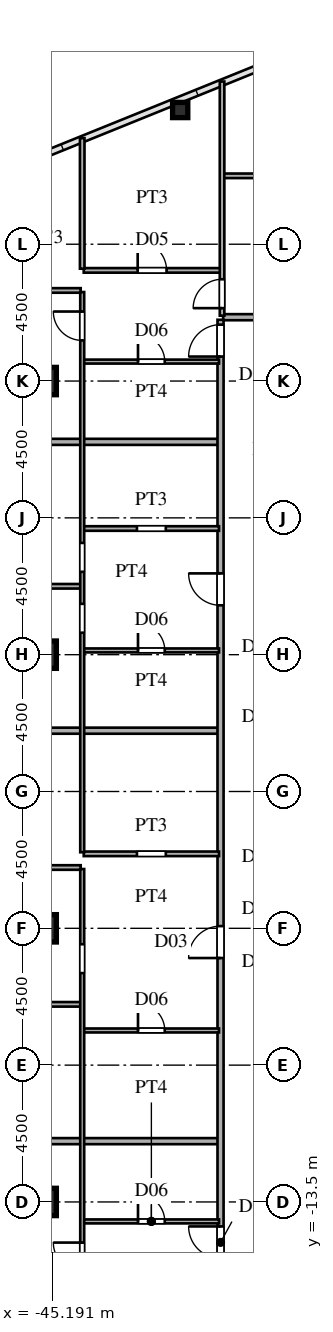
"""IFC4 building model, lengths in metres.
Left out: names, types, materials, properties, quantities, classifications, styles, units other than length and angle.
Written with IfcOpenShell. Run it as: python <this file> out.ifc"""

import sys

from ifc_helpers import new_model, si_unit, direction, frame, frame_2d, origin, origin_2d, place, context, subcontext, project, spatial, rectangle, hollow_rectangle, i_section, extrude, source, transform, mapped, element, fill, save


model = new_model("IFC4")
c1 = context("Model", 3, precision=1e-05, world=origin(), true_north=direction((0.0, 1.0)))
c2 = subcontext(c1, "Body", "Model", "MODEL_VIEW")
j1 = project(units=[si_unit("LENGTHUNIT", "METRE"), si_unit("PLANEANGLEUNIT", "RADIAN")], contexts=[c1])
p1 = place(None, origin())
s1 = spatial("IfcSite", under=j1, at=p1, CompositionType="ELEMENT")
p2 = place(p1, origin())
s2 = spatial("IfcBuilding", under=s1, at=p2, CompositionType="ELEMENT")
p3 = place(p2, frame((0.0, 0.0, 33.3)))
s3 = spatial("IfcBuildingStorey", under=s2, at=p3, CompositionType="ELEMENT", Elevation=33.3)
m1 = source(origin(), c2, "Body", "SweptSolid", [
    extrude(i_section(OverallWidth=0.9, OverallDepth=0.9, WebThickness=0.036, FlangeThickness=0.055, at=origin_2d()), origin(), (0.0, 0.0, 1.0), 3.6),
])
for number, where, z_axis, x_axis in (
    (1, (-45.5, -13.5, 0.0), (0.0, 0.0, 1.0), (1.0, 0.0, 0.0)),
    (2, (-45.5, -4.5, 0.0), (0.0, 0.0, 1.0), (1.0, 0.0, 0.0)),
    (3, (-45.5, 4.5, 0.0), (0.0, 0.0, 1.0), (1.0, 0.0, 0.0)),
    (4, (-45.5, 13.5, 0.0), (0.0, 0.0, 1.0), (1.0, 0.0, 0.0)),
):
    element("IfcColumn", number, at=place(p3, frame(where, z_axis=z_axis, x_axis=x_axis)), inside=s3, PredefinedType="COLUMN", context=c2, shape_type="MappedRepresentation", body=[
        mapped(m1, transform((0.0, 0.0, 0.0), scale=1.0)),
    ])
m2 = source(origin(), c2, "Body", "SweptSolid", [
    extrude(hollow_rectangle(XDim=0.5, YDim=0.5, WallThickness=0.02, at=origin_2d()), origin(), (0.0, 0.0, 1.0), 3.6),
])
p4 = place(p3, frame((-40.977, 22.414, 0.0), z_axis=(0.0, 0.0, 1.0), x_axis=(1.0, 0.0, 0.0)))
e5 = element("IfcColumn", 5, at=p4, inside=s3, PredefinedType="COLUMN", context=c2, shape_type="MappedRepresentation", body=[
    mapped(m2, transform((0.0, 0.0, 0.0), scale=1.0)),
])
p5 = place(p3, frame((-44.15, -14.14, 0.0), z_axis=(0.0, 0.0, 1.0), x_axis=(1.0, 0.0, 0.0)))
e6 = element("IfcWall", 6, at=p5, inside=s3, PredefinedType="PARTITIONING", context=c2, shape_type="SweptSolid", body=[
    extrude(rectangle(XDim=4.45, YDim=0.13, at=frame_2d((2.225, 0.0))), origin(), (0.0, 0.0, 1.0), 3.38),
])
p6 = place(p5, frame((1.785, 0.0, 0.0)))
e7 = element("IfcOpeningElement", 7, at=p6, cuts=e6, PredefinedType="OPENING", context=c2, shape_type="SweptSolid", body=[
    extrude(rectangle(XDim=0.88, YDim=2.1, at=frame_2d((0.44, 1.05))), frame((0.0, 0.075, 0.0), z_axis=(0.0, -1.0, 0.0), x_axis=(1.0, 0.0, 0.0)), (0.0, 0.0, 1.0), 0.15),
])
p7 = place(p3, frame((-68.807, -11.5, 0.0), z_axis=(0.0, 0.0, 1.0), x_axis=(1.0, 0.0, 0.0)))
e8 = element("IfcWall", 8, at=p7, inside=s3, PredefinedType="PARTITIONING", context=c2, shape_type="SweptSolid", body=[
    extrude(rectangle(XDim=29.077, YDim=0.2, at=frame_2d((14.539, 0.0))), origin(), (0.0, 0.0, 1.0), 3.38),
])
p8 = place(p3, frame((-44.15, -7.86, 0.0), z_axis=(0.0, 0.0, 1.0), x_axis=(1.0, 0.0, 0.0)))
e9 = element("IfcWall", 9, at=p8, inside=s3, PredefinedType="PARTITIONING", context=c2, shape_type="SweptSolid", body=[
    extrude(rectangle(XDim=4.45, YDim=0.13, at=frame_2d((2.225, 0.0))), origin(), (0.0, 0.0, 1.0), 3.38),
])
p9 = place(p8, frame((1.785, 0.0, 0.0)))
e10 = element("IfcOpeningElement", 10, at=p9, cuts=e9, PredefinedType="OPENING", context=c2, shape_type="SweptSolid", body=[
    extrude(rectangle(XDim=0.88, YDim=2.1, at=frame_2d((0.44, 1.05))), frame((0.0, 0.075, 0.0), z_axis=(0.0, -1.0, 0.0), x_axis=(1.0, 0.0, 0.0)), (0.0, 0.0, 1.0), 0.15),
])
p10 = place(p3, frame((-72.535, -7.0, 0.0), z_axis=(0.0, 0.0, 1.0), x_axis=(1.0, 0.0, 0.0)))
e11 = element("IfcWall", 11, at=p10, inside=s3, PredefinedType="PARTITIONING", context=c2, shape_type="SweptSolid", body=[
    extrude(rectangle(XDim=28.285, YDim=0.15, at=frame_2d((14.143, 0.0))), origin(), (0.0, 0.0, 1.0), 3.38),
])
p11 = place(p10, frame((22.71, 0.0, 0.0)))
e12 = element("IfcOpeningElement", 12, at=p11, cuts=e11, PredefinedType="OPENING", context=c2, shape_type="SweptSolid", body=[
    extrude(rectangle(XDim=0.95, YDim=2.15, at=frame_2d((0.475, 1.075))), frame((0.0, 0.085, 0.0), z_axis=(0.0, -1.0, 0.0), x_axis=(1.0, 0.0, 0.0)), (0.0, 0.0, 1.0), 0.17),
])
p12 = place(p10, frame((14.71, 0.0, 0.0)))
e13 = element("IfcOpeningElement", 13, at=p12, cuts=e11, PredefinedType="OPENING", context=c2, shape_type="SweptSolid", body=[
    extrude(rectangle(XDim=0.95, YDim=2.15, at=frame_2d((0.475, 1.075))), frame((0.0, 0.085, 0.0), z_axis=(0.0, -1.0, 0.0), x_axis=(1.0, 0.0, 0.0)), (0.0, 0.0, 1.0), 0.17),
])
p13 = place(p3, frame((-72.535, -2.5, 0.0), z_axis=(0.0, 0.0, 1.0), x_axis=(1.0, 0.0, 0.0)))
e14 = element("IfcWall", 14, at=p13, inside=s3, PredefinedType="PARTITIONING", context=c2, shape_type="SweptSolid", body=[
    extrude(rectangle(XDim=28.285, YDim=0.15, at=frame_2d((14.143, 0.0))), origin(), (0.0, 0.0, 1.0), 3.38),
])
p14 = place(p13, frame((22.71, 0.0, 0.0)))
e15 = element("IfcOpeningElement", 15, at=p14, cuts=e14, PredefinedType="OPENING", context=c2, shape_type="SweptSolid", body=[
    extrude(rectangle(XDim=0.95, YDim=2.15, at=frame_2d((0.475, 1.075))), frame((0.0, 0.085, 0.0), z_axis=(0.0, -1.0, 0.0), x_axis=(1.0, 0.0, 0.0)), (0.0, 0.0, 1.0), 0.17),
])
p15 = place(p13, frame((14.71, 0.0, 0.0)))
e16 = element("IfcOpeningElement", 16, at=p15, cuts=e14, PredefinedType="OPENING", context=c2, shape_type="SweptSolid", body=[
    extrude(rectangle(XDim=0.95, YDim=2.15, at=frame_2d((0.475, 1.075))), frame((0.0, 0.085, 0.0), z_axis=(0.0, -1.0, 0.0), x_axis=(1.0, 0.0, 0.0)), (0.0, 0.0, 1.0), 0.17),
])
p16 = place(p3, frame((-44.15, -2.05, 0.0), z_axis=(0.0, 0.0, 1.0), x_axis=(1.0, 0.0, 0.0)))
e17 = element("IfcWall", 17, at=p16, inside=s3, PredefinedType="PARTITIONING", context=c2, shape_type="SweptSolid", body=[
    extrude(rectangle(XDim=4.45, YDim=0.15, at=frame_2d((2.225, 0.0))), origin(), (0.0, 0.0, 1.0), 3.38),
])
p17 = place(p16, frame((1.75, 0.0, 0.0)))
e18 = element("IfcOpeningElement", 18, at=p17, cuts=e17, PredefinedType="OPENING", context=c2, shape_type="SweptSolid", body=[
    extrude(rectangle(XDim=0.95, YDim=2.15, at=frame_2d((0.475, 1.075))), frame((0.0, 0.085, 0.0), z_axis=(0.0, -1.0, 0.0), x_axis=(1.0, 0.0, 0.0)), (0.0, 0.0, 1.0), 0.17),
])
p18 = place(p3, frame((-72.505, 2.0, 0.0), z_axis=(0.0, 0.0, 1.0), x_axis=(1.0, 0.0, 0.0)))
e19 = element("IfcWall", 19, at=p18, inside=s3, PredefinedType="PARTITIONING", context=c2, shape_type="SweptSolid", body=[
    extrude(rectangle(XDim=32.775, YDim=0.2, at=frame_2d((16.387, 0.0))), origin(), (0.0, 0.0, 1.0), 3.38),
])
p19 = place(p3, frame((-44.15, 4.64, 0.0), z_axis=(0.0, 0.0, 1.0), x_axis=(1.0, 0.0, 0.0)))
e20 = element("IfcWall", 20, at=p19, inside=s3, PredefinedType="PARTITIONING", context=c2, shape_type="SweptSolid", body=[
    extrude(rectangle(XDim=4.45, YDim=0.13, at=frame_2d((2.225, 0.0))), origin(), (0.0, 0.0, 1.0), 2.68),
])
p20 = place(p19, frame((1.785, 0.0, 0.0)))
e21 = element("IfcOpeningElement", 21, at=p20, cuts=e20, PredefinedType="OPENING", context=c2, shape_type="SweptSolid", body=[
    extrude(rectangle(XDim=0.88, YDim=2.1, at=frame_2d((0.44, 1.05))), frame((0.0, 0.075, 0.0), z_axis=(0.0, -1.0, 0.0), x_axis=(1.0, 0.0, 0.0)), (0.0, 0.0, 1.0), 0.15),
])
p21 = place(p3, frame((-72.535, 6.75, 0.0), z_axis=(0.0, 0.0, 1.0), x_axis=(1.0, 0.0, 0.0)))
e22 = element("IfcWall", 22, at=p21, inside=s3, PredefinedType="PARTITIONING", context=c2, shape_type="SweptSolid", body=[
    extrude(rectangle(XDim=28.285, YDim=0.15, at=frame_2d((14.143, 0.0))), origin(), (0.0, 0.0, 1.0), 3.38),
])
p22 = place(p21, frame((5.71, 0.0, 0.0)))
e23 = element("IfcOpeningElement", 23, at=p22, cuts=e22, PredefinedType="OPENING", context=c2, shape_type="SweptSolid", body=[
    extrude(rectangle(XDim=0.95, YDim=2.15, at=frame_2d((0.475, 1.075))), frame((0.0, 0.085, 0.0), z_axis=(0.0, -1.0, 0.0), x_axis=(1.0, 0.0, 0.0)), (0.0, 0.0, 1.0), 0.17),
])
p23 = place(p21, frame((14.71, 0.0, 0.0)))
e24 = element("IfcOpeningElement", 24, at=p23, cuts=e22, PredefinedType="OPENING", context=c2, shape_type="SweptSolid", body=[
    extrude(rectangle(XDim=0.95, YDim=2.15, at=frame_2d((0.475, 1.075))), frame((0.0, 0.085, 0.0), z_axis=(0.0, -1.0, 0.0), x_axis=(1.0, 0.0, 0.0)), (0.0, 0.0, 1.0), 0.17),
])
p24 = place(p3, frame((-44.15, 8.65, 0.0), z_axis=(0.0, 0.0, 1.0), x_axis=(1.0, 0.0, 0.0)))
e25 = element("IfcWall", 25, at=p24, inside=s3, PredefinedType="PARTITIONING", context=c2, shape_type="SweptSolid", body=[
    extrude(rectangle(XDim=4.45, YDim=0.15, at=frame_2d((2.225, 0.0))), origin(), (0.0, 0.0, 1.0), 3.38),
])
p25 = place(p24, frame((1.75, 0.0, 0.0)))
e26 = element("IfcOpeningElement", 26, at=p25, cuts=e25, PredefinedType="OPENING", context=c2, shape_type="SweptSolid", body=[
    extrude(rectangle(XDim=0.95, YDim=2.15, at=frame_2d((0.475, 1.075))), frame((0.0, 0.085, 0.0), z_axis=(0.0, -1.0, 0.0), x_axis=(1.0, 0.0, 0.0)), (0.0, 0.0, 1.0), 0.17),
])
p26 = place(p3, frame((-68.807, 11.5, 0.0), z_axis=(0.0, 0.0, 1.0), x_axis=(1.0, 0.0, 0.0)))
e27 = element("IfcWall", 27, at=p26, inside=s3, PredefinedType="PARTITIONING", context=c2, shape_type="SweptSolid", body=[
    extrude(rectangle(XDim=29.077, YDim=0.2, at=frame_2d((14.539, 0.0))), origin(), (0.0, 0.0, 1.0), 3.38),
])
p27 = place(p3, frame((-44.15, 14.14, 0.0), z_axis=(0.0, 0.0, 1.0), x_axis=(1.0, 0.0, 0.0)))
e28 = element("IfcWall", 28, at=p27, inside=s3, PredefinedType="PARTITIONING", context=c2, shape_type="SweptSolid", body=[
    extrude(rectangle(XDim=4.45, YDim=0.13, at=frame_2d((2.225, 0.0))), origin(), (0.0, 0.0, 1.0), 3.38),
])
p28 = place(p27, frame((1.785, 0.0, 0.0)))
e29 = element("IfcOpeningElement", 29, at=p28, cuts=e28, PredefinedType="OPENING", context=c2, shape_type="SweptSolid", body=[
    extrude(rectangle(XDim=0.88, YDim=2.1, at=frame_2d((0.44, 1.05))), frame((0.0, 0.075, 0.0), z_axis=(0.0, -1.0, 0.0), x_axis=(1.0, 0.0, 0.0)), (0.0, 0.0, 1.0), 0.15),
])
p29 = place(p3, frame((-39.565, 15.6, 0.0), z_axis=(0.0, 0.0, 1.0), x_axis=(1.0, 0.0, 0.0)))
e30 = element("IfcWall", 30, at=p29, inside=s3, PredefinedType="PARTITIONING", context=c2, shape_type="SweptSolid", body=[
    extrude(rectangle(XDim=2.98, YDim=0.2, at=frame_2d((1.49, 0.0))), origin(), (0.0, 0.0, 1.0), 3.38),
])
p30 = place(p3, frame((-54.45, 16.48, 0.0), z_axis=(0.0, 0.0, 1.0), x_axis=(1.0, 0.0, 0.0)))
e31 = element("IfcWall", 31, at=p30, inside=s3, PredefinedType="PARTITIONING", context=c2, shape_type="SweptSolid", body=[
    extrude(rectangle(XDim=10.2, YDim=0.15, at=frame_2d((5.1, 0.0))), origin(), (0.0, 0.0, 1.0), 3.38),
])
p31 = place(p30, frame((4.625, 0.0, 0.0)))
e32 = element("IfcOpeningElement", 32, at=p31, cuts=e31, PredefinedType="OPENING", context=c2, shape_type="SweptSolid", body=[
    extrude(rectangle(XDim=0.95, YDim=2.15, at=frame_2d((0.475, 1.075))), frame((0.0, 0.085, 0.0), z_axis=(0.0, -1.0, 0.0), x_axis=(1.0, 0.0, 0.0)), (0.0, 0.0, 1.0), 0.17),
])
p32 = place(p3, frame((-44.15, 17.14, 0.0), z_axis=(0.0, 0.0, 1.0), x_axis=(1.0, 0.0, 0.0)))
e33 = element("IfcWall", 33, at=p32, inside=s3, PredefinedType="PARTITIONING", context=c2, shape_type="SweptSolid", body=[
    extrude(rectangle(XDim=4.5, YDim=0.15, at=frame_2d((2.25, 0.0))), origin(), (0.0, 0.0, 1.0), 3.38),
])
p33 = place(p32, frame((1.775, 0.0, 0.0)))
e34 = element("IfcOpeningElement", 34, at=p33, cuts=e33, PredefinedType="OPENING", context=c2, shape_type="SweptSolid", body=[
    extrude(rectangle(XDim=0.95, YDim=2.15, at=frame_2d((0.475, 1.075))), frame((0.0, 0.085, 0.0), z_axis=(0.0, -1.0, 0.0), x_axis=(1.0, 0.0, 0.0)), (0.0, 0.0, 1.0), 0.17),
])
p34 = place(p3, frame((-39.55, 20.25, 0.0), z_axis=(0.0, 0.0, 1.0), x_axis=(1.0, 0.0, 0.0)))
e35 = element("IfcWall", 35, at=p34, inside=s3, PredefinedType="PARTITIONING", context=c2, shape_type="SweptSolid", body=[
    extrude(rectangle(XDim=12.085, YDim=0.15, at=frame_2d((6.042, 0.0))), origin(), (0.0, 0.0, 1.0), 3.38),
])
p35 = place(p34, frame((5.525, 0.0, 0.0)))
e36 = element("IfcOpeningElement", 36, at=p35, cuts=e35, PredefinedType="OPENING", context=c2, shape_type="SweptSolid", body=[
    extrude(rectangle(XDim=0.95, YDim=2.15, at=frame_2d((0.475, 1.075))), frame((0.0, 0.085, 0.0), z_axis=(0.0, -1.0, 0.0), x_axis=(1.0, 0.0, 0.0)), (0.0, 0.0, 1.0), 0.17),
])
p36 = place(p3, frame((-44.2, -16.427, 0.0), z_axis=(0.0, 0.0, 1.0), x_axis=(0.0, 1.0, 0.0)))
e37 = element("IfcWall", 37, at=p36, inside=s3, PredefinedType="PARTITIONING", context=c2, shape_type="SweptSolid", body=[
    extrude(rectangle(XDim=13.877, YDim=0.13, at=frame_2d((6.938, 0.0))), origin(), (0.0, 0.0, 1.0), 3.38),
])
p37 = place(p36, frame((0.641, 0.0, 0.0)))
e38 = element("IfcOpeningElement", 38, at=p37, cuts=e37, PredefinedType="OPENING", context=c2, shape_type="SweptSolid", body=[
    extrude(rectangle(XDim=0.95, YDim=2.15, at=frame_2d((0.475, 1.075))), frame((0.0, 0.075, 0.0), z_axis=(0.0, -1.0, 0.0), x_axis=(1.0, 0.0, 0.0)), (0.0, 0.0, 1.0), 0.15),
])
p38 = place(p36, frame((10.454, 0.0, 0.0)))
e39 = element("IfcOpeningElement", 39, at=p38, cuts=e37, PredefinedType="OPENING", context=c2, shape_type="SweptSolid", body=[
    extrude(rectangle(XDim=0.95, YDim=2.15, at=frame_2d((0.475, 1.075))), frame((0.0, 0.075, 0.0), z_axis=(0.0, -1.0, 0.0), x_axis=(1.0, 0.0, 0.0)), (0.0, 0.0, 1.0), 0.15),
])
p39 = place(p3, frame((-44.2, -1.998, 0.0), z_axis=(0.0, 0.0, 1.0), x_axis=(0.0, 1.0, 0.0)))
e40 = element("IfcWall", 40, at=p39, inside=s3, PredefinedType="PARTITIONING", context=c2, shape_type="SweptSolid", body=[
    extrude(rectangle(XDim=18.425, YDim=0.13, at=frame_2d((9.212, 0.0))), origin(), (0.0, 0.0, 1.0), 3.38),
])
p40 = place(p39, frame((7.22, 0.0, 0.0)))
e41 = element("IfcOpeningElement", 41, at=p40, cuts=e40, PredefinedType="OPENING", context=c2, shape_type="SweptSolid", body=[
    extrude(rectangle(XDim=0.95, YDim=2.15, at=frame_2d((0.475, 1.075))), frame((0.0, 0.075, 0.0), z_axis=(0.0, -1.0, 0.0), x_axis=(1.0, 0.0, 0.0)), (0.0, 0.0, 1.0), 0.15),
])
p41 = place(p39, frame((9.224, 0.0, 0.0)))
e42 = element("IfcOpeningElement", 42, at=p41, cuts=e40, PredefinedType="OPENING", context=c2, shape_type="SweptSolid", body=[
    extrude(rectangle(XDim=0.95, YDim=2.15, at=frame_2d((0.475, 1.075))), frame((0.0, 0.075, 0.0), z_axis=(0.0, -1.0, 0.0), x_axis=(1.0, 0.0, 0.0)), (0.0, 0.0, 1.0), 0.15),
])
p42 = place(p39, frame((16.834, 0.0, 0.0)))
e43 = element("IfcOpeningElement", 43, at=p42, cuts=e40, PredefinedType="OPENING", context=c2, shape_type="SweptSolid", body=[
    extrude(rectangle(XDim=0.95, YDim=2.15, at=frame_2d((0.475, 1.075))), frame((0.0, 0.075, 0.0), z_axis=(0.0, -1.0, 0.0), x_axis=(1.0, 0.0, 0.0)), (0.0, 0.0, 1.0), 0.15),
])
p43 = place(p3, frame((-44.2, 17.195, 0.0), z_axis=(0.0, 0.0, 1.0), x_axis=(0.0, 1.0, 0.0)))
e44 = element("IfcWall", 44, at=p43, inside=s3, PredefinedType="PARTITIONING", context=c2, shape_type="SweptSolid", body=[
    extrude(rectangle(XDim=4.295, YDim=0.15, at=frame_2d((2.147, 0.0))), origin(), (0.0, 0.0, 1.0), 3.38),
])
p44 = place(p3, frame((-39.65, -15.515, 0.0), z_axis=(0.0, 0.0, 1.0), x_axis=(0.0, 1.0, 0.0)))
e45 = element("IfcWall", 45, at=p44, inside=s3, PredefinedType="PARTITIONING", context=c2, shape_type="SweptSolid", body=[
    extrude(rectangle(XDim=31.03, YDim=0.2, at=frame_2d((15.515, 0.0))), origin(), (0.0, 0.0, 1.0), 3.38),
])
p45 = place(p44, frame((0.16, 0.0, 0.0)))
e46 = element("IfcOpeningElement", 46, at=p45, cuts=e45, PredefinedType="OPENING", context=c2, shape_type="SweptSolid", body=[
    extrude(rectangle(XDim=1.05, YDim=2.25, at=frame_2d((0.525, 1.125))), frame((0.0, 0.11, 0.0), z_axis=(0.0, -1.0, 0.0), x_axis=(1.0, 0.0, 0.0)), (0.0, 0.0, 1.0), 0.22),
])
p46 = place(p44, frame((10.038, 0.0, 0.0)))
e47 = element("IfcOpeningElement", 47, at=p46, cuts=e45, PredefinedType="OPENING", context=c2, shape_type="SweptSolid", body=[
    extrude(rectangle(XDim=1.05, YDim=2.25, at=frame_2d((0.525, 1.125))), frame((0.0, 0.11, 0.0), z_axis=(0.0, -1.0, 0.0), x_axis=(1.0, 0.0, 0.0)), (0.0, 0.0, 1.0), 0.22),
])
p47 = place(p44, frame((21.638, 0.0, 0.0)))
e48 = element("IfcOpeningElement", 48, at=p47, cuts=e45, PredefinedType="OPENING", context=c2, shape_type="SweptSolid", body=[
    extrude(rectangle(XDim=1.05, YDim=2.25, at=frame_2d((0.525, 1.125))), frame((0.0, 0.11, 0.0), z_axis=(0.0, -1.0, 0.0), x_axis=(1.0, 0.0, 0.0)), (0.0, 0.0, 1.0), 0.22),
])
p48 = place(p44, frame((29.82, 0.0, 0.0)))
e49 = element("IfcOpeningElement", 49, at=p48, cuts=e45, PredefinedType="OPENING", context=c2, shape_type="SweptSolid", body=[
    extrude(rectangle(XDim=1.05, YDim=2.25, at=frame_2d((0.525, 1.125))), frame((0.0, 0.11, 0.0), z_axis=(0.0, -1.0, 0.0), x_axis=(1.0, 0.0, 0.0)), (0.0, 0.0, 1.0), 0.22),
])
p49 = place(p3, frame((-39.6, 15.65, 0.0), z_axis=(0.0, 0.0, 1.0), x_axis=(0.0, 1.0, 0.0)))
e50 = element("IfcWall", 50, at=p49, inside=s3, PredefinedType="PARTITIONING", context=c2, shape_type="SweptSolid", body=[
    extrude(rectangle(XDim=7.702, YDim=0.15, at=frame_2d((3.851, 0.0))), origin(), (0.0, 0.0, 1.0), 3.38),
])
p50 = place(p49, frame((0.248, 0.0, 0.0)))
e51 = element("IfcOpeningElement", 51, at=p50, cuts=e50, PredefinedType="OPENING", context=c2, shape_type="SweptSolid", body=[
    extrude(rectangle(XDim=0.95, YDim=2.15, at=frame_2d((0.475, 1.075))), frame((0.0, 0.085, 0.0), z_axis=(0.0, -1.0, 0.0), x_axis=(1.0, 0.0, 0.0)), (0.0, 0.0, 1.0), 0.17),
])
m3 = source(origin(), c2, "Body", "SweptSolid", [
    extrude(rectangle(XDim=0.88, YDim=2.1, at=frame_2d((0.44, 1.05))), frame((0.0, 0.025, 0.0), z_axis=(0.0, -1.0, 0.0), x_axis=(1.0, 0.0, 0.0)), (0.0, 0.0, 1.0), 0.05),
])
p51 = place(p6, origin())
e52 = element("IfcDoor", 52, at=p51, inside=s3, OperationType="SINGLE_SWING_LEFT", PredefinedType="DOOR", context=c2, shape_type="MappedRepresentation", body=[
    mapped(m3, transform((0.0, 0.0, 0.0), scale=1.0)),
])
fill(e7, e52)
p52 = place(p9, origin())
e53 = element("IfcDoor", 53, at=p52, inside=s3, OperationType="SINGLE_SWING_LEFT", PredefinedType="DOOR", context=c2, shape_type="MappedRepresentation", body=[
    mapped(m3, transform((0.0, 0.0, 0.0), scale=1.0)),
])
fill(e10, e53)
p53 = place(p20, origin())
e54 = element("IfcDoor", 54, at=p53, inside=s3, OperationType="SINGLE_SWING_LEFT", PredefinedType="DOOR", context=c2, shape_type="MappedRepresentation", body=[
    mapped(m3, transform((0.0, 0.0, 0.0), scale=1.0)),
])
fill(e21, e54)
p54 = place(p28, origin())
e55 = element("IfcDoor", 55, at=p54, inside=s3, OperationType="SINGLE_SWING_LEFT", PredefinedType="DOOR", context=c2, shape_type="MappedRepresentation", body=[
    mapped(m3, transform((0.0, 0.0, 0.0), scale=1.0)),
])
fill(e29, e55)
m4 = source(origin(), c2, "Body", "SweptSolid", [
    extrude(rectangle(XDim=0.95, YDim=2.15, at=frame_2d((0.475, 1.075))), frame((0.0, 0.025, 0.0), z_axis=(0.0, -1.0, 0.0), x_axis=(1.0, 0.0, 0.0)), (0.0, 0.0, 1.0), 0.05),
])
p55 = place(p33, origin())
e56 = element("IfcDoor", 56, at=p55, inside=s3, OperationType="SINGLE_SWING_LEFT", PredefinedType="DOOR", context=c2, shape_type="MappedRepresentation", body=[
    mapped(m4, transform((0.0, 0.0, 0.0), scale=1.0)),
])
fill(e34, e56)
p56 = place(p37, origin())
e57 = element("IfcDoor", 57, at=p56, inside=s3, OperationType="SINGLE_SWING_RIGHT", PredefinedType="DOOR", context=c2, shape_type="MappedRepresentation", body=[
    mapped(m4, transform((0.0, 0.0, 0.0), scale=1.0)),
])
fill(e38, e57)
p57 = place(p42, origin())
e58 = element("IfcDoor", 58, at=p57, inside=s3, OperationType="SINGLE_SWING_RIGHT", PredefinedType="DOOR", context=c2, shape_type="MappedRepresentation", body=[
    mapped(m4, transform((0.0, 0.0, 0.0), scale=1.0)),
])
fill(e43, e58)
m5 = source(origin(), c2, "Body", "SweptSolid", [
    extrude(rectangle(XDim=1.05, YDim=2.25, at=frame_2d((0.525, 1.125))), frame((0.0, 0.025, 0.0), z_axis=(0.0, -1.0, 0.0), x_axis=(1.0, 0.0, 0.0)), (0.0, 0.0, 1.0), 0.05),
])
p58 = place(p45, origin())
e59 = element("IfcDoor", 59, at=p58, inside=s3, OperationType="SINGLE_SWING_RIGHT", PredefinedType="DOOR", context=c2, shape_type="MappedRepresentation", body=[
    mapped(m5, transform((0.0, 0.0, 0.0), scale=1.0)),
])
fill(e46, e59)
p59 = place(p46, origin())
e60 = element("IfcDoor", 60, at=p59, inside=s3, OperationType="SINGLE_SWING_LEFT", PredefinedType="DOOR", context=c2, shape_type="MappedRepresentation", body=[
    mapped(m5, transform((0.0, 0.0, 0.0), scale=1.0)),
])
fill(e47, e60)
p60 = place(p47, origin())
e61 = element("IfcDoor", 61, at=p60, inside=s3, OperationType="SINGLE_SWING_RIGHT", PredefinedType="DOOR", context=c2, shape_type="MappedRepresentation", body=[
    mapped(m5, transform((0.0, 0.0, 0.0), scale=1.0)),
])
fill(e48, e61)
p61 = place(p48, origin())
e62 = element("IfcDoor", 62, at=p61, inside=s3, OperationType="SINGLE_SWING_LEFT", PredefinedType="DOOR", context=c2, shape_type="MappedRepresentation", body=[
    mapped(m5, transform((0.0, 0.0, 0.0), scale=1.0)),
])
fill(e49, e62)
p62 = place(p50, origin())
e63 = element("IfcDoor", 63, at=p62, inside=s3, OperationType="SINGLE_SWING_LEFT", PredefinedType="DOOR", context=c2, shape_type="MappedRepresentation", body=[
    mapped(m4, transform((0.0, 0.0, 0.0), scale=1.0)),
])
fill(e51, e63)
save(model, sys.argv[1])
